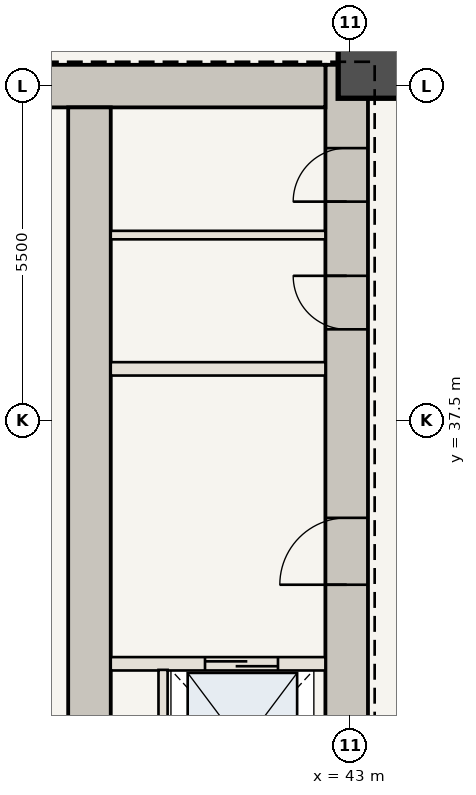
"""IFC4 building model, lengths in metres.
Left out: names, types, materials, properties, quantities, classifications, styles, units other than length and angle.
Written with IfcOpenShell. Run it as: python <this file> out.ifc"""

import sys

from ifc_helpers import new_model, si_unit, direction, frame, frame_2d, origin, origin_2d, place, context, subcontext, project, spatial, rectangle, extrude, element, fill, save


model = new_model("IFC4")
c1 = context("Model", 3, precision=1e-05, world=origin(), true_north=direction((0.0, 1.0)))
c2 = subcontext(c1, "Body", "Model", "MODEL_VIEW")
j1 = project(units=[si_unit("LENGTHUNIT", "METRE"), si_unit("PLANEANGLEUNIT", "RADIAN")], contexts=[c1])
p1 = place(None, origin())
s1 = spatial("IfcSite", under=j1, at=p1, CompositionType="ELEMENT")
p2 = place(p1, origin())
s2 = spatial("IfcBuilding", under=s1, at=p2, CompositionType="ELEMENT")
p3 = place(p2, frame((0.0, 0.0, 56.35)))
s3 = spatial("IfcBuildingStorey", under=s2, at=p3, CompositionType="ELEMENT", Elevation=56.35)
p4 = place(p3, frame((42.94, 30.6, 0.0), z_axis=(0.0, 0.0, 1.0), x_axis=(0.0, 1.0, 0.0)))
e1 = element("IfcWall", 1, at=p4, inside=s3, PredefinedType="SHEAR", context=c2, shape_type="SweptSolid", body=[
    extrude(rectangle(XDim=12.75, YDim=0.7, at=frame_2d((6.375, 0.0))), origin(), (0.0, 0.0, 1.0), 3.5),
])
p5 = place(p4, frame((4.2, 0.0, 0.0)))
e2 = element("IfcOpeningElement", 2, at=p5, cuts=e1, PredefinedType="OPENING", context=c2, shape_type="SweptSolid", body=[
    extrude(rectangle(XDim=1.1, YDim=2.15, at=frame_2d((0.55, 1.075))), frame((0.0, 0.36, 0.0), z_axis=(0.0, -1.0, 0.0), x_axis=(1.0, 0.0, 0.0)), (0.0, 0.0, 1.0), 0.72),
])
p6 = place(p4, frame((8.4, 0.0, 0.0)))
e3 = element("IfcOpeningElement", 3, at=p6, cuts=e1, PredefinedType="OPENING", context=c2, shape_type="SweptSolid", body=[
    extrude(rectangle(XDim=0.88, YDim=2.1, at=frame_2d((0.44, 1.05))), frame((0.0, 0.36, 0.0), z_axis=(0.0, -1.0, 0.0), x_axis=(1.0, 0.0, 0.0)), (0.0, 0.0, 1.0), 0.72),
])
p7 = place(p4, frame((10.5, 0.0, 0.0)))
e4 = element("IfcOpeningElement", 4, at=p7, cuts=e1, PredefinedType="OPENING", context=c2, shape_type="SweptSolid", body=[
    extrude(rectangle(XDim=0.88, YDim=2.1, at=frame_2d((0.44, 1.05))), frame((0.0, 0.36, 0.0), z_axis=(0.0, -1.0, 0.0), x_axis=(1.0, 0.0, 0.0)), (0.0, 0.0, 1.0), 0.72),
])
p8 = place(p3, frame((37.75, 43.0, 0.0), z_axis=(0.0, 0.0, 1.0), x_axis=(1.0, 0.0, 0.0)))
e5 = element("IfcWall", 5, at=p8, inside=s3, PredefinedType="SHEAR", context=c2, shape_type="SweptSolid", body=[
    extrude(rectangle(XDim=4.84, YDim=0.7, at=frame_2d((2.42, 0.0))), origin(), (0.0, 0.0, 1.0), 3.5),
])
p9 = place(p3, frame((38.71, 30.6, 0.0), z_axis=(0.0, 0.0, 1.0), x_axis=(0.0, 1.0, 0.0)))
e6 = element("IfcWall", 6, at=p9, inside=s3, PredefinedType="SHEAR", context=c2, shape_type="SweptSolid", body=[
    extrude(rectangle(XDim=12.05, YDim=0.7, at=frame_2d((6.025, 0.0))), origin(), (0.0, 0.0, 1.0), 3.5),
])
p10 = place(p3, frame((43.35, 43.35, 0.0), z_axis=(0.0, 0.0, 1.0), x_axis=(1.0, 0.0, 0.0)))
e7 = element("IfcColumn", 7, at=p10, inside=s3, PredefinedType="COLUMN", context=c2, shape_type="SweptSolid", body=[
    extrude(rectangle(XDim=1.1, YDim=1.1, at=origin_2d()), origin(), (0.0, 0.0, 1.0), 3.5),
])
p11 = place(p3, frame((39.06, 33.5, 0.0), z_axis=(0.0, 0.0, 1.0), x_axis=(1.0, 0.0, 0.0)))
e8 = element("IfcWall", 8, at=p11, inside=s3, PredefinedType="STANDARD", context=c2, shape_type="SweptSolid", body=[
    extrude(rectangle(XDim=3.53, YDim=0.22, at=frame_2d((1.765, 0.0))), origin(), (0.0, 0.0, 1.0), 3.32),
])
p12 = place(p11, frame((1.55, 0.0, 0.0)))
e9 = element("IfcOpeningElement", 9, at=p12, cuts=e8, PredefinedType="OPENING", context=c2, shape_type="SweptSolid", body=[
    extrude(rectangle(XDim=1.2, YDim=2.2, at=frame_2d((0.6, 1.1))), frame((0.0, 0.12, 0.0), z_axis=(0.0, -1.0, 0.0), x_axis=(1.0, 0.0, 0.0)), (0.0, 0.0, 1.0), 0.24),
])
p13 = place(p3, frame((39.92, 30.75, 0.0), z_axis=(0.0, 0.0, 1.0), x_axis=(0.0, 1.0, 0.0)))
e10 = element("IfcWall", 10, at=p13, inside=s3, PredefinedType="STANDARD", context=c2, shape_type="SweptSolid", body=[
    extrude(rectangle(XDim=2.65, YDim=0.15, at=frame_2d((1.325, 0.0))), origin(), (0.0, 0.0, 1.0), 3.32),
])
p14 = place(p3, frame((39.06, 38.35, 0.0), z_axis=(0.0, 0.0, 1.0), x_axis=(1.0, 0.0, 0.0)))
e11 = element("IfcWall", 11, at=p14, inside=s3, PredefinedType="STANDARD", context=c2, shape_type="SweptSolid", body=[
    extrude(rectangle(XDim=3.53, YDim=0.22, at=frame_2d((1.765, 0.0))), origin(), (0.0, 0.0, 1.0), 3.32),
])
p15 = place(p3, frame((39.06, 40.55, 0.0), z_axis=(0.0, 0.0, 1.0), x_axis=(1.0, 0.0, 0.0)))
e12 = element("IfcWall", 12, at=p15, inside=s3, PredefinedType="STANDARD", context=c2, shape_type="SweptSolid", body=[
    extrude(rectangle(XDim=3.53, YDim=0.14, at=frame_2d((1.765, 0.0))), origin(), (0.0, 0.0, 1.0), 3.32),
])
p16 = place(p5, origin())
e13 = element("IfcDoor", 13, at=p16, inside=s3, OperationType="SINGLE_SWING_LEFT", PredefinedType="DOOR", context=c2, shape_type="SweptSolid", body=[
    extrude(rectangle(XDim=1.1, YDim=2.15, at=frame_2d((0.55, 1.075))), frame((0.0, 0.025, 0.0), z_axis=(0.0, -1.0, 0.0), x_axis=(1.0, 0.0, 0.0)), (0.0, 0.0, 1.0), 0.05),
])
fill(e2, e13)
p17 = place(p6, origin())
e14 = element("IfcDoor", 14, at=p17, inside=s3, OperationType="SINGLE_SWING_RIGHT", PredefinedType="DOOR", context=c2, shape_type="SweptSolid", body=[
    extrude(rectangle(XDim=0.88, YDim=2.1, at=frame_2d((0.44, 1.05))), frame((0.0, 0.025, 0.0), z_axis=(0.0, -1.0, 0.0), x_axis=(1.0, 0.0, 0.0)), (0.0, 0.0, 1.0), 0.05),
])
fill(e3, e14)
p18 = place(p7, origin())
e15 = element("IfcDoor", 15, at=p18, inside=s3, OperationType="SINGLE_SWING_LEFT", PredefinedType="DOOR", context=c2, shape_type="SweptSolid", body=[
    extrude(rectangle(XDim=0.88, YDim=2.1, at=frame_2d((0.44, 1.05))), frame((0.0, 0.025, 0.0), z_axis=(0.0, -1.0, 0.0), x_axis=(1.0, 0.0, 0.0)), (0.0, 0.0, 1.0), 0.05),
])
fill(e4, e15)
p19 = place(p12, origin())
e16 = element("IfcDoor", 16, at=p19, inside=s3, OperationType="DOUBLE_DOOR_SLIDING", PredefinedType="DOOR", context=c2, shape_type="SweptSolid", body=[
    extrude(rectangle(XDim=1.2, YDim=2.2, at=frame_2d((0.6, 1.1))), frame((0.0, 0.025, 0.0), z_axis=(0.0, -1.0, 0.0), x_axis=(1.0, 0.0, 0.0)), (0.0, 0.0, 1.0), 0.05),
])
fill(e9, e16)
save(model, sys.argv[1])
